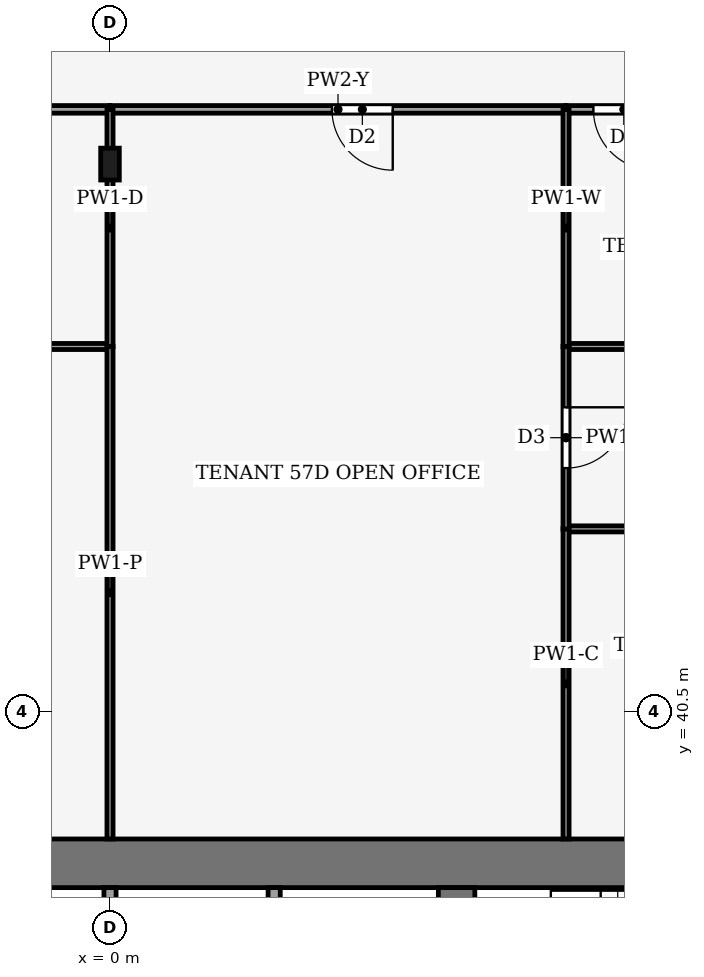
"""IFC4 building model, lengths in metres.
Left out: names, types, materials, properties, quantities, classifications, styles, units other than length and angle.
Written with IfcOpenShell. Run it as: python <this file> out.ifc"""

import sys

from ifc_helpers import new_model, si_unit, direction, frame, frame_2d, origin, origin_2d, place, context, subcontext, project, spatial, rectangle, i_section, extrude, element, fill, save


model = new_model("IFC4")
c1 = context("Model", 3, precision=1e-05, world=origin(), true_north=direction((0.0, 1.0)))
c2 = subcontext(c1, "Body", "Model", "MODEL_VIEW")
j1 = project(units=[si_unit("LENGTHUNIT", "METRE"), si_unit("PLANEANGLEUNIT", "RADIAN")], contexts=[c1])
p1 = place(None, origin())
s1 = spatial("IfcSite", under=j1, at=p1, CompositionType="ELEMENT")
p2 = place(p1, origin())
s2 = spatial("IfcBuilding", under=s1, at=p2, CompositionType="ELEMENT")
p3 = place(p2, frame((0.0, 0.0, 250.0)))
s3 = spatial("IfcBuildingStorey", under=s2, at=p3, CompositionType="ELEMENT", Elevation=250.0)
p4 = place(p3, frame((-13.4, 38.0, -0.13), z_axis=(0.0, 0.0, 1.0), x_axis=(1.0, 0.0, 0.0)))
e1 = element("IfcWall", 1, at=p4, inside=s3, PredefinedType="SHEAR", context=c2, shape_type="SweptSolid", body=[
    extrude(rectangle(XDim=26.8, YDim=0.8, at=frame_2d((13.4, 0.0))), origin(), (0.0, 0.0, 1.0), 4.0),
])
p5 = place(p3, frame((5.7, 18.4, -0.13), z_axis=(0.0, 0.0, 1.0), x_axis=(0.0, 1.0, 0.0)))
e2 = element("IfcWall", 2, at=p5, inside=s3, PredefinedType="SHEAR", context=c2, shape_type="SweptSolid", body=[
    extrude(rectangle(XDim=19.2, YDim=0.6, at=frame_2d((9.6, 0.0))), origin(), (0.0, 0.0, 1.0), 4.0),
])
p6 = place(p5, frame((13.3, 0.0, 0.13)))
e3 = element("IfcOpeningElement", 3, at=p6, cuts=e2, PredefinedType="OPENING", context=c2, shape_type="SweptSolid", body=[
    extrude(rectangle(XDim=2.4, YDim=2.4, at=frame_2d((1.2, 1.2))), frame((0.0, 0.31, 0.0), z_axis=(0.0, -1.0, 0.0), x_axis=(1.0, 0.0, 0.0)), (0.0, 0.0, 1.0), 0.62),
])
p7 = place(p3, frame((0.0, 49.5, 0.0), z_axis=(0.0, 0.0, 1.0), x_axis=(1.0, 0.0, 0.0)))
e4 = element("IfcColumn", 4, at=p7, inside=s3, PredefinedType="COLUMN", context=c2, shape_type="SweptSolid", body=[
    extrude(i_section(OverallWidth=0.306, OverallDepth=0.524, WebThickness=0.012, FlangeThickness=0.04, FilletRadius=0.027, at=origin_2d()), origin(), (0.0, 0.0, 1.0), 4.0),
])
for number, where, z_axis, x_axis in (
    (5, (0.0, 34.0, 0.0), (0.0, 0.0, 1.0), (0.0, 1.0, 0.0)),
    (6, (2.7, 34.0, 0.0), (0.0, 0.0, 1.0), (0.0, 1.0, 0.0)),
):
    element("IfcWall", number, at=place(p3, frame(where, z_axis=z_axis, x_axis=x_axis)), inside=s3, PredefinedType="PARTITIONING", context=c2, shape_type="SweptSolid", body=[
        extrude(rectangle(XDim=3.6, YDim=0.2, at=frame_2d((1.8, 0.0))), origin(), (0.0, 0.0, 1.0), 3.87),
    ])
p8 = place(p3, frame((0.0, 50.4, 0.0), z_axis=(0.0, 0.0, 1.0), x_axis=(-1.0, 0.0, 0.0)))
e7 = element("IfcWall", 7, at=p8, inside=s3, PredefinedType="PARTITIONING", context=c2, shape_type="SweptSolid", body=[
    extrude(rectangle(XDim=7.5, YDim=0.125, at=frame_2d((3.75, 0.0))), origin(), (0.0, 0.0, 1.0), 3.24),
])
p9 = place(p8, frame((3.65, 0.0, 0.0)))
e8 = element("IfcOpeningElement", 8, at=p9, cuts=e7, PredefinedType="OPENING", context=c2, shape_type="SweptSolid", body=[
    extrude(rectangle(XDim=1.0, YDim=2.1, at=frame_2d((0.5, 1.05))), frame((0.0, 0.073, 0.0), z_axis=(0.0, -1.0, 0.0), x_axis=(1.0, 0.0, 0.0)), (0.0, 0.0, 1.0), 0.145),
])
p10 = place(p3, frame((13.4, 50.4, 0.0), z_axis=(0.0, 0.0, 1.0), x_axis=(-1.0, 0.0, 0.0)))
e9 = element("IfcWall", 9, at=p10, inside=s3, PredefinedType="PARTITIONING", context=c2, shape_type="SweptSolid", body=[
    extrude(rectangle(XDim=5.9, YDim=0.125, at=frame_2d((2.95, 0.0))), origin(), (0.0, 0.0, 1.0), 3.24),
])
p11 = place(p10, frame((4.45, 0.0, 0.0)))
e10 = element("IfcOpeningElement", 10, at=p11, cuts=e9, PredefinedType="OPENING", context=c2, shape_type="SweptSolid", body=[
    extrude(rectangle(XDim=1.0, YDim=2.1, at=frame_2d((0.5, 1.05))), frame((0.0, 0.073, 0.0), z_axis=(0.0, -1.0, 0.0), x_axis=(1.0, 0.0, 0.0)), (0.0, 0.0, 1.0), 0.145),
])
p12 = place(p3, frame((7.5, 50.4, 0.0), z_axis=(0.0, 0.0, 1.0), x_axis=(-1.0, 0.0, 0.0)))
e11 = element("IfcWall", 11, at=p12, inside=s3, PredefinedType="PARTITIONING", context=c2, shape_type="SweptSolid", body=[
    extrude(rectangle(XDim=7.5, YDim=0.125, at=frame_2d((3.75, 0.0))), origin(), (0.0, 0.0, 1.0), 3.24),
])
p13 = place(p12, frame((2.85, 0.0, 0.0)))
e12 = element("IfcOpeningElement", 12, at=p13, cuts=e11, PredefinedType="OPENING", context=c2, shape_type="SweptSolid", body=[
    extrude(rectangle(XDim=1.0, YDim=2.1, at=frame_2d((0.5, 1.05))), frame((0.0, 0.073, 0.0), z_axis=(0.0, -1.0, 0.0), x_axis=(1.0, 0.0, 0.0)), (0.0, 0.0, 1.0), 0.145),
])
p14 = place(p3, frame((0.0, 46.5, 0.0), z_axis=(0.0, 0.0, 1.0), x_axis=(-1.0, 0.0, 0.0)))
e13 = element("IfcWall", 13, at=p14, inside=s3, PredefinedType="PARTITIONING", context=c2, shape_type="SweptSolid", body=[
    extrude(rectangle(XDim=7.5, YDim=0.1, at=frame_2d((3.75, 0.0))), origin(), (0.0, 0.0, 1.0), 3.44),
])
p15 = place(p3, frame((0.0, 38.4, 0.0), z_axis=(0.0, 0.0, 1.0), x_axis=(0.0, 1.0, 0.0)))
e14 = element("IfcWall", 14, at=p15, inside=s3, PredefinedType="PARTITIONING", context=c2, shape_type="SweptSolid", body=[
    extrude(rectangle(XDim=8.104, YDim=0.1, at=frame_2d((4.052, 0.0))), origin(), (0.0, 0.0, 1.0), 3.44),
])
p16 = place(p3, frame((0.0, 46.496, 0.0), z_axis=(0.0, 0.0, 1.0), x_axis=(0.0, 1.0, 0.0)))
e15 = element("IfcWall", 15, at=p16, inside=s3, PredefinedType="PARTITIONING", context=c2, shape_type="SweptSolid", body=[
    extrude(rectangle(XDim=3.904, YDim=0.1, at=frame_2d((1.952, 0.0))), origin(), (0.0, 0.0, 1.0), 3.29),
])
p17 = place(p3, frame((13.4, 43.5, 0.0), z_axis=(0.0, 0.0, 1.0), x_axis=(-1.0, 0.0, 0.0)))
e16 = element("IfcWall", 16, at=p17, inside=s3, PredefinedType="PARTITIONING", context=c2, shape_type="SweptSolid", body=[
    extrude(rectangle(XDim=5.9, YDim=0.1, at=frame_2d((2.95, 0.0))), origin(), (0.0, 0.0, 1.0), 3.44),
])
p18 = place(p3, frame((7.5, 43.504, 0.0), z_axis=(0.0, 0.0, 1.0), x_axis=(0.0, -1.0, 0.0)))
e17 = element("IfcWall", 17, at=p18, inside=s3, PredefinedType="PARTITIONING", context=c2, shape_type="SweptSolid", body=[
    extrude(rectangle(XDim=5.104, YDim=0.1, at=frame_2d((2.552, 0.0))), origin(), (0.0, 0.0, 1.0), 3.87),
])
p19 = place(p3, frame((13.4, 46.5, 0.0), z_axis=(0.0, 0.0, 1.0), x_axis=(-1.0, 0.0, 0.0)))
e18 = element("IfcWall", 18, at=p19, inside=s3, PredefinedType="PARTITIONING", context=c2, shape_type="SweptSolid", body=[
    extrude(rectangle(XDim=5.9, YDim=0.1, at=frame_2d((2.95, 0.0))), origin(), (0.0, 0.0, 1.0), 3.44),
])
p20 = place(p3, frame((7.5, 46.504, 0.0), z_axis=(0.0, 0.0, 1.0), x_axis=(0.0, -1.0, 0.0)))
e19 = element("IfcWall", 19, at=p20, inside=s3, PredefinedType="PARTITIONING", context=c2, shape_type="SweptSolid", body=[
    extrude(rectangle(XDim=3.008, YDim=0.1, at=frame_2d((1.504, 0.0))), origin(), (0.0, 0.0, 1.0), 3.87),
])
p21 = place(p20, frame((1.004, 0.0, 0.0)))
e20 = element("IfcOpeningElement", 20, at=p21, cuts=e19, PredefinedType="OPENING", context=c2, shape_type="SweptSolid", body=[
    extrude(rectangle(XDim=1.0, YDim=2.1, at=frame_2d((0.5, 1.05))), frame((0.0, 0.06, 0.0), z_axis=(0.0, -1.0, 0.0), x_axis=(1.0, 0.0, 0.0)), (0.0, 0.0, 1.0), 0.12),
])
p22 = place(p3, frame((7.5, 50.4, 0.0), z_axis=(0.0, 0.0, 1.0), x_axis=(0.0, -1.0, 0.0)))
e21 = element("IfcWall", 21, at=p22, inside=s3, PredefinedType="PARTITIONING", context=c2, shape_type="SweptSolid", body=[
    extrude(rectangle(XDim=3.904, YDim=0.1, at=frame_2d((1.952, 0.0))), origin(), (0.0, 0.0, 1.0), 3.24),
])
p23 = place(p11, origin())
e22 = element("IfcDoor", 22, at=p23, inside=s3, OperationType="SINGLE_SWING_RIGHT", PredefinedType="DOOR", context=c2, shape_type="SweptSolid", body=[
    extrude(rectangle(XDim=1.0, YDim=2.1, at=frame_2d((0.5, 1.05))), frame((0.0, 0.025, 0.0), z_axis=(0.0, -1.0, 0.0), x_axis=(1.0, 0.0, 0.0)), (0.0, 0.0, 1.0), 0.05),
])
fill(e10, e22)
p24 = place(p13, origin())
e23 = element("IfcDoor", 23, at=p24, inside=s3, OperationType="SINGLE_SWING_LEFT", PredefinedType="DOOR", context=c2, shape_type="SweptSolid", body=[
    extrude(rectangle(XDim=1.0, YDim=2.1, at=frame_2d((0.5, 1.05))), frame((0.0, 0.025, 0.0), z_axis=(0.0, -1.0, 0.0), x_axis=(1.0, 0.0, 0.0)), (0.0, 0.0, 1.0), 0.05),
])
fill(e12, e23)
p25 = place(p21, origin())
e24 = element("IfcDoor", 24, at=p25, inside=s3, OperationType="SINGLE_SWING_LEFT", PredefinedType="DOOR", context=c2, shape_type="SweptSolid", body=[
    extrude(rectangle(XDim=1.0, YDim=2.1, at=frame_2d((0.5, 1.05))), frame((0.0, 0.025, 0.0), z_axis=(0.0, -1.0, 0.0), x_axis=(1.0, 0.0, 0.0)), (0.0, 0.0, 1.0), 0.05),
])
fill(e20, e24)
save(model, sys.argv[1])
